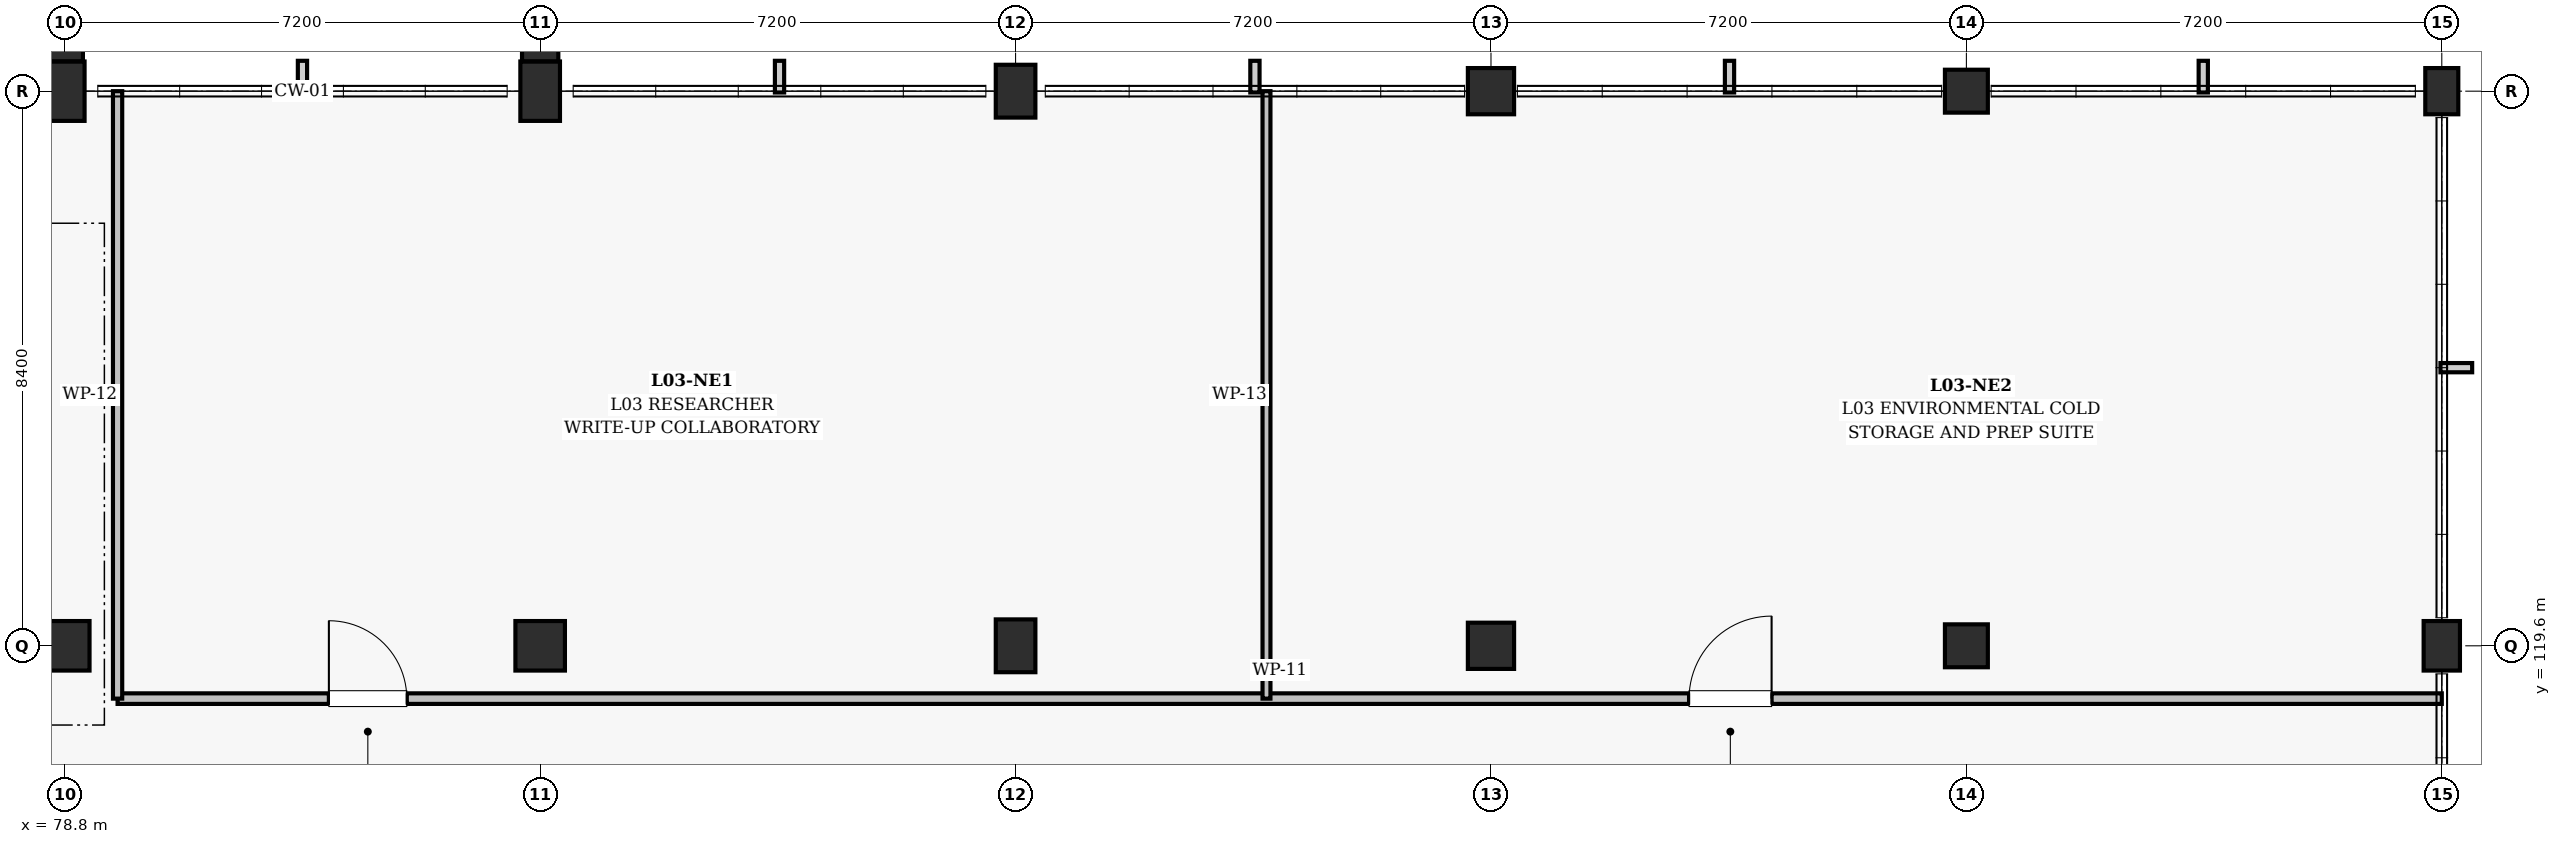
"""IFC4 building model, lengths in metres.
Left out: names, types, materials, properties, quantities, classifications, styles, units other than length and angle.
Written with IfcOpenShell. Run it as: python <this file> out.ifc"""

import sys

from ifc_helpers import new_model, si_unit, direction, frame, frame_2d, origin, origin_2d, place, context, subcontext, project, spatial, rectangle, extrude, element, fill, save


model = new_model("IFC4")
c1 = context("Model", 3, precision=1e-05, world=origin(), true_north=direction((0.0, 1.0)))
c2 = subcontext(c1, "Body", "Model", "MODEL_VIEW")
j1 = project(units=[si_unit("LENGTHUNIT", "METRE"), si_unit("PLANEANGLEUNIT", "RADIAN")], contexts=[c1])
p1 = place(None, origin())
s1 = spatial("IfcSite", under=j1, at=p1, CompositionType="ELEMENT")
p2 = place(p1, origin())
s2 = spatial("IfcBuilding", under=s1, at=p2, CompositionType="ELEMENT")
p3 = place(p2, frame((0.0, 0.0, 14.4)))
s3 = spatial("IfcBuildingStorey", under=s2, at=p3, CompositionType="ELEMENT", Elevation=14.4)
p4 = place(p3, frame((78.8, 119.6, 0.0), z_axis=(0.0, 0.0, 1.0), x_axis=(1.0, 0.0, 0.0)))
e1 = element("IfcColumn", 1, at=p4, inside=s3, PredefinedType="COLUMN", context=c2, shape_type="SweptSolid", body=[
    extrude(rectangle(XDim=0.75, YDim=0.75, at=origin_2d()), origin(), (0.0, 0.0, 1.0), 4.5),
])
p5 = place(p3, frame((78.8, 128.0, 0.0), z_axis=(0.0, 0.0, 1.0), x_axis=(1.0, 0.0, 0.0)))
e2 = element("IfcColumn", 2, at=p5, inside=s3, PredefinedType="COLUMN", context=c2, shape_type="SweptSolid", body=[
    extrude(rectangle(XDim=0.6, YDim=0.9, at=origin_2d()), origin(), (0.0, 0.0, 1.0), 4.5),
])
p6 = place(p3, frame((86.0, 119.6, 0.0), z_axis=(0.0, 0.0, 1.0), x_axis=(1.0, 0.0, 0.0)))
e3 = element("IfcColumn", 3, at=p6, inside=s3, PredefinedType="COLUMN", context=c2, shape_type="SweptSolid", body=[
    extrude(rectangle(XDim=0.75, YDim=0.75, at=origin_2d()), origin(), (0.0, 0.0, 1.0), 4.5),
])
p7 = place(p3, frame((86.0, 128.0, 0.0), z_axis=(0.0, 0.0, 1.0), x_axis=(1.0, 0.0, 0.0)))
e4 = element("IfcColumn", 4, at=p7, inside=s3, PredefinedType="COLUMN", context=c2, shape_type="SweptSolid", body=[
    extrude(rectangle(XDim=0.6, YDim=0.9, at=origin_2d()), origin(), (0.0, 0.0, 1.0), 4.5),
])
for number, where, z_axis, x_axis in (
    (5, (93.2, 119.6, 0.0), (0.0, 0.0, 1.0), (1.0, 0.0, 0.0)),
    (6, (93.2, 128.0, 0.0), (0.0, 0.0, 1.0), (1.0, 0.0, 0.0)),
):
    element("IfcColumn", number, at=place(p3, frame(where, z_axis=z_axis, x_axis=x_axis)), inside=s3, PredefinedType="COLUMN", context=c2, shape_type="SweptSolid", body=[
        extrude(rectangle(XDim=0.6, YDim=0.8, at=origin_2d()), origin(), (0.0, 0.0, 1.0), 4.5),
    ])
for number, where, z_axis, x_axis in (
    (7, (100.4, 119.6, 0.0), (0.0, 0.0, 1.0), (1.0, 0.0, 0.0)),
    (8, (100.4, 128.0, 0.0), (0.0, 0.0, 1.0), (1.0, 0.0, 0.0)),
):
    element("IfcColumn", number, at=place(p3, frame(where, z_axis=z_axis, x_axis=x_axis)), inside=s3, PredefinedType="COLUMN", context=c2, shape_type="SweptSolid", body=[
        extrude(rectangle(XDim=0.7, YDim=0.7, at=origin_2d()), origin(), (0.0, 0.0, 1.0), 4.5),
    ])
for number, where, z_axis, x_axis in (
    (9, (107.6, 119.6, 0.0), (0.0, 0.0, 1.0), (1.0, 0.0, 0.0)),
    (10, (107.6, 128.0, 0.0), (0.0, 0.0, 1.0), (1.0, 0.0, 0.0)),
):
    element("IfcColumn", number, at=place(p3, frame(where, z_axis=z_axis, x_axis=x_axis)), inside=s3, PredefinedType="COLUMN", context=c2, shape_type="SweptSolid", body=[
        extrude(rectangle(XDim=0.65, YDim=0.65, at=origin_2d()), origin(), (0.0, 0.0, 1.0), 4.5),
    ])
p8 = place(p3, frame((114.8, 119.6, 0.0), z_axis=(0.0, 0.0, 1.0), x_axis=(1.0, 0.0, 0.0)))
e11 = element("IfcColumn", 11, at=p8, inside=s3, PredefinedType="COLUMN", context=c2, shape_type="SweptSolid", body=[
    extrude(rectangle(XDim=0.55, YDim=0.75, at=origin_2d()), origin(), (0.0, 0.0, 1.0), 4.5),
])
p9 = place(p3, frame((114.8, 128.0, 0.0), z_axis=(0.0, 0.0, 1.0), x_axis=(1.0, 0.0, 0.0)))
e12 = element("IfcColumn", 12, at=p9, inside=s3, PredefinedType="COLUMN", context=c2, shape_type="SweptSolid", body=[
    extrude(rectangle(XDim=0.5, YDim=0.7, at=origin_2d()), origin(), (0.0, 0.0, 1.0), 4.5),
])
for number, where, z_axis, x_axis in (
    (13, (78.8, 128.853, 0.0), (0.0, 0.0, 1.0), (1.0, 0.0, 0.0)),
    (14, (86.0, 128.853, 0.0), (0.0, 0.0, 1.0), (1.0, 0.0, 0.0)),
):
    element("IfcColumn", number, at=place(p3, frame(where, z_axis=z_axis, x_axis=x_axis)), inside=s3, PredefinedType="PILASTER", context=c2, shape_type="SweptSolid", body=[
        extrude(rectangle(XDim=0.55, YDim=0.8, at=origin_2d()), origin(), (0.0, 0.0, 1.0), 4.5),
    ])
p10 = place(p3, frame((79.6, 118.8, 0.0), z_axis=(0.0, 0.0, 1.0), x_axis=(1.0, 0.0, 0.0)))
e15 = element("IfcWall", 15, at=p10, inside=s3, PredefinedType="PARTITIONING", context=c2, shape_type="SweptSolid", body=[
    extrude(rectangle(XDim=35.2, YDim=0.16, at=frame_2d((17.6, 0.0))), origin(), (0.0, 0.0, 1.0), 2.96),
])
p11 = place(p10, frame((3.2, 0.0, 0.0)))
e16 = element("IfcOpeningElement", 16, at=p11, cuts=e15, PredefinedType="OPENING", context=c2, shape_type="SweptSolid", body=[
    extrude(rectangle(XDim=1.18, YDim=2.2, at=frame_2d((0.59, 1.1))), frame((0.0, 0.09, 0.0), z_axis=(0.0, -1.0, 0.0), x_axis=(1.0, 0.0, 0.0)), (0.0, 0.0, 1.0), 0.18),
])
p12 = place(p10, frame((23.8, 0.0, 0.0)))
e17 = element("IfcOpeningElement", 17, at=p12, cuts=e15, PredefinedType="OPENING", context=c2, shape_type="SweptSolid", body=[
    extrude(rectangle(XDim=1.25, YDim=2.2, at=frame_2d((0.625, 1.1))), frame((0.0, 0.09, 0.0), z_axis=(0.0, -1.0, 0.0), x_axis=(1.0, 0.0, 0.0)), (0.0, 0.0, 1.0), 0.18),
])
p13 = place(p3, frame((79.6, 118.8, 0.0), z_axis=(0.0, 0.0, 1.0), x_axis=(0.0, 1.0, 0.0)))
e18 = element("IfcWall", 18, at=p13, inside=s3, PredefinedType="PARTITIONING", context=c2, shape_type="SweptSolid", body=[
    extrude(rectangle(XDim=9.2, YDim=0.14, at=frame_2d((4.6, 0.0))), origin(), (0.0, 0.0, 1.0), 3.51),
])
p14 = place(p3, frame((97.0, 118.8, 0.0), z_axis=(0.0, 0.0, 1.0), x_axis=(0.0, 1.0, 0.0)))
e19 = element("IfcWall", 19, at=p14, inside=s3, PredefinedType="PARTITIONING", context=c2, shape_type="SweptSolid", body=[
    extrude(rectangle(XDim=9.2, YDim=0.12, at=frame_2d((4.6, 0.0))), origin(), (0.0, 0.0, 1.0), 3.36),
])
p15 = place(p11, origin())
e20 = element("IfcDoor", 20, at=p15, inside=s3, OperationType="SINGLE_SWING_LEFT", PredefinedType="DOOR", context=c2, shape_type="SweptSolid", body=[
    extrude(rectangle(XDim=1.18, YDim=2.2, at=frame_2d((0.59, 1.1))), frame((0.0, 0.025, 0.0), z_axis=(0.0, -1.0, 0.0), x_axis=(1.0, 0.0, 0.0)), (0.0, 0.0, 1.0), 0.05),
])
fill(e16, e20)
p16 = place(p12, origin())
e21 = element("IfcDoor", 21, at=p16, inside=s3, OperationType="SINGLE_SWING_RIGHT", PredefinedType="DOOR", context=c2, shape_type="SweptSolid", body=[
    extrude(rectangle(XDim=1.25, YDim=2.2, at=frame_2d((0.625, 1.1))), frame((0.0, 0.025, 0.0), z_axis=(0.0, -1.0, 0.0), x_axis=(1.0, 0.0, 0.0)), (0.0, 0.0, 1.0), 0.05),
])
fill(e17, e21)
save(model, sys.argv[1])
